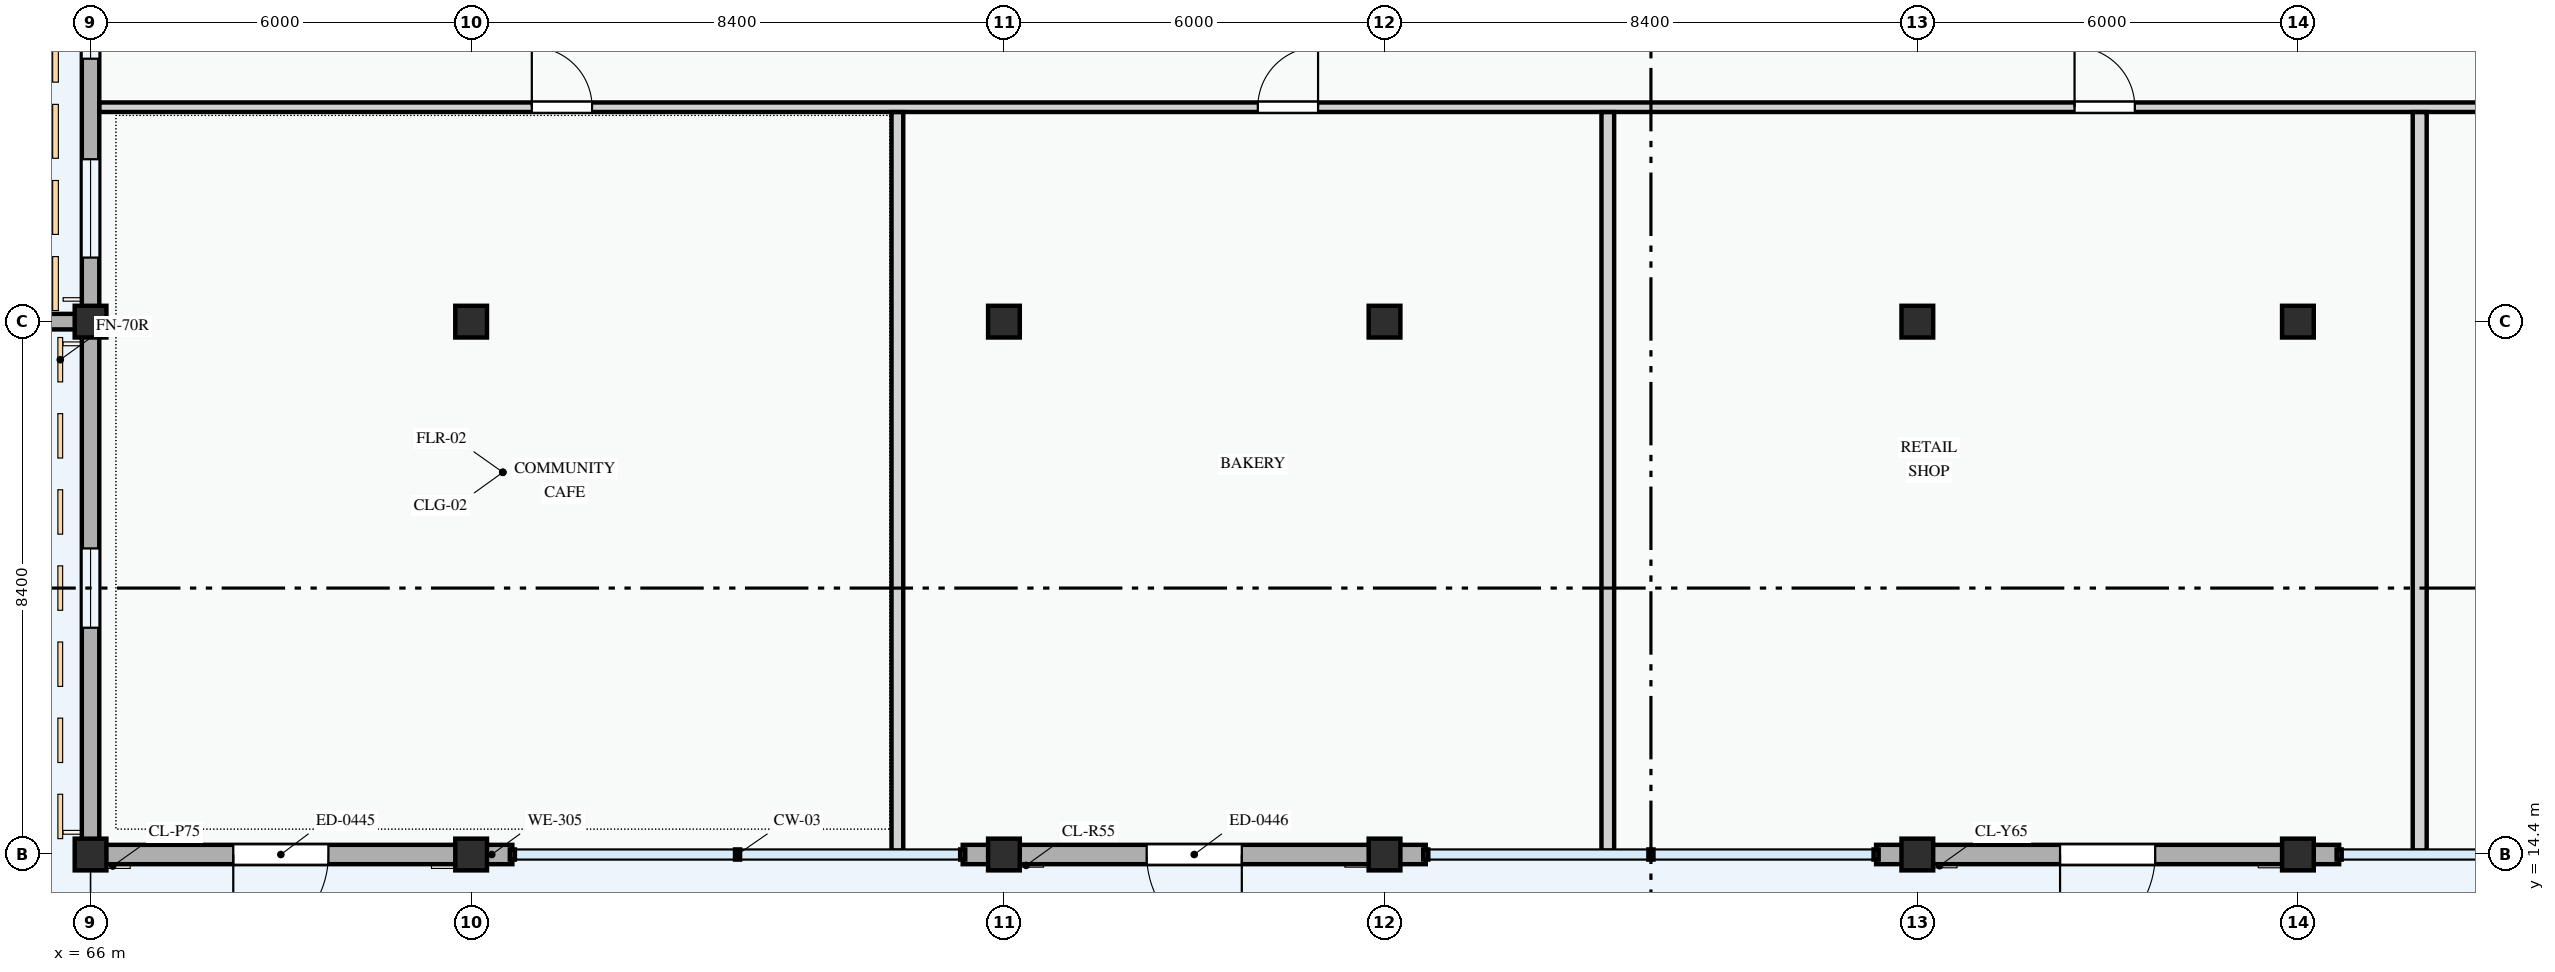
"""IFC4 building model, lengths in metres.
Left out: names, types, materials, properties, quantities, classifications, styles, units other than length and angle.
Written with IfcOpenShell. Run it as: python <this file> out.ifc"""

import sys

from ifc_helpers import new_model, si_unit, direction, frame, frame_2d, origin, origin_2d, place, context, subcontext, project, spatial, rectangle, circle, extrude, element, fill, save


model = new_model("IFC4")
c1 = context("Model", 3, precision=1e-05, world=origin(), true_north=direction((0.0, 1.0)))
c2 = subcontext(c1, "Body", "Model", "MODEL_VIEW")
j1 = project(units=[si_unit("LENGTHUNIT", "METRE"), si_unit("PLANEANGLEUNIT", "RADIAN")], contexts=[c1])
p1 = place(None, origin())
s1 = spatial("IfcSite", under=j1, at=p1, CompositionType="ELEMENT")
p2 = place(p1, origin())
s2 = spatial("IfcBuilding", under=s1, at=p2, CompositionType="ELEMENT")
p3 = place(p2, origin())
s3 = spatial("IfcBuildingStorey", under=s2, at=p3, CompositionType="ELEMENT", Elevation=0.0)
for number, where, z_axis, x_axis in (
    (1, (66.0, 14.4, 0.0), (0.0, 0.0, 1.0), (1.0, 0.0, 0.0)),
    (2, (66.0, 22.8, 0.0), (0.0, 0.0, 1.0), (1.0, 0.0, 0.0)),
    (3, (72.0, 14.4, 0.0), (0.0, 0.0, 1.0), (1.0, 0.0, 0.0)),
):
    element("IfcColumn", number, at=place(p3, frame(where, z_axis=z_axis, x_axis=x_axis)), inside=s3, PredefinedType="COLUMN", context=c2, shape_type="SweptSolid", body=[
        extrude(rectangle(XDim=0.5, YDim=0.5, at=origin_2d()), origin(), (0.0, 0.0, 1.0), 4.5),
    ])
p4 = place(p3, frame((72.0, 22.8, 0.0), z_axis=(0.0, 0.0, 1.0), x_axis=(1.0, 0.0, 0.0)))
e4 = element("IfcColumn", 4, at=p4, inside=s3, PredefinedType="COLUMN", context=c2, shape_type="SweptSolid", body=[
    extrude(circle(Radius=0.25, at=origin_2d()), origin(), (0.0, 0.0, 1.0), 4.5),
])
p5 = place(p3, frame((80.4, 14.4, 0.0), z_axis=(0.0, 0.0, 1.0), x_axis=(1.0, 0.0, 0.0)))
e5 = element("IfcColumn", 5, at=p5, inside=s3, PredefinedType="COLUMN", context=c2, shape_type="SweptSolid", body=[
    extrude(rectangle(XDim=0.5, YDim=0.5, at=origin_2d()), origin(), (0.0, 0.0, 1.0), 4.5),
])
p6 = place(p3, frame((80.4, 22.8, 0.0), z_axis=(0.0, 0.0, 1.0), x_axis=(1.0, 0.0, 0.0)))
e6 = element("IfcColumn", 6, at=p6, inside=s3, PredefinedType="COLUMN", context=c2, shape_type="SweptSolid", body=[
    extrude(circle(Radius=0.25, at=origin_2d()), origin(), (0.0, 0.0, 1.0), 4.5),
])
p7 = place(p3, frame((86.4, 14.4, 0.0), z_axis=(0.0, 0.0, 1.0), x_axis=(1.0, 0.0, 0.0)))
e7 = element("IfcColumn", 7, at=p7, inside=s3, PredefinedType="COLUMN", context=c2, shape_type="SweptSolid", body=[
    extrude(rectangle(XDim=0.5, YDim=0.5, at=origin_2d()), origin(), (0.0, 0.0, 1.0), 4.5),
])
p8 = place(p3, frame((86.4, 22.8, 0.0), z_axis=(0.0, 0.0, 1.0), x_axis=(1.0, 0.0, 0.0)))
e8 = element("IfcColumn", 8, at=p8, inside=s3, PredefinedType="COLUMN", context=c2, shape_type="SweptSolid", body=[
    extrude(circle(Radius=0.25, at=origin_2d()), origin(), (0.0, 0.0, 1.0), 4.5),
])
p9 = place(p3, frame((94.8, 14.4, 0.0), z_axis=(0.0, 0.0, 1.0), x_axis=(1.0, 0.0, 0.0)))
e9 = element("IfcColumn", 9, at=p9, inside=s3, PredefinedType="COLUMN", context=c2, shape_type="SweptSolid", body=[
    extrude(rectangle(XDim=0.5, YDim=0.5, at=origin_2d()), origin(), (0.0, 0.0, 1.0), 4.5),
])
p10 = place(p3, frame((94.8, 22.8, 0.0), z_axis=(0.0, 0.0, 1.0), x_axis=(1.0, 0.0, 0.0)))
e10 = element("IfcColumn", 10, at=p10, inside=s3, PredefinedType="COLUMN", context=c2, shape_type="SweptSolid", body=[
    extrude(circle(Radius=0.25, at=origin_2d()), origin(), (0.0, 0.0, 1.0), 4.5),
])
p11 = place(p3, frame((100.8, 14.4, 0.0), z_axis=(0.0, 0.0, 1.0), x_axis=(1.0, 0.0, 0.0)))
e11 = element("IfcColumn", 11, at=p11, inside=s3, PredefinedType="COLUMN", context=c2, shape_type="SweptSolid", body=[
    extrude(rectangle(XDim=0.5, YDim=0.5, at=origin_2d()), origin(), (0.0, 0.0, 1.0), 4.5),
])
p12 = place(p3, frame((100.8, 22.8, 0.0), z_axis=(0.0, 0.0, 1.0), x_axis=(1.0, 0.0, 0.0)))
e12 = element("IfcColumn", 12, at=p12, inside=s3, PredefinedType="COLUMN", context=c2, shape_type="SweptSolid", body=[
    extrude(circle(Radius=0.25, at=origin_2d()), origin(), (0.0, 0.0, 1.0), 4.5),
])
p13 = place(p3, frame((66.0, 14.4, 0.0), z_axis=(0.0, 0.0, 1.0), x_axis=(1.0, 0.0, 0.0)))
e13 = element("IfcWall", 13, at=p13, inside=s3, PredefinedType="STANDARD", context=c2, shape_type="SweptSolid", body=[
    extrude(rectangle(XDim=6.0, YDim=0.305, at=frame_2d((3.0, 0.0))), origin(), (0.0, 0.0, 1.0), 3.585),
])
p14 = place(p13, frame((2.25, 0.0, 0.0)))
e14 = element("IfcOpeningElement", 14, at=p14, cuts=e13, PredefinedType="OPENING", context=c2, shape_type="SweptSolid", body=[
    extrude(rectangle(XDim=1.5, YDim=2.3, at=frame_2d((0.75, 1.15))), frame((0.0, 0.163, 0.0), z_axis=(0.0, -1.0, 0.0), x_axis=(1.0, 0.0, 0.0)), (0.0, 0.0, 1.0), 0.325),
])
for number, where, z_axis, x_axis in (
    (15, (72.0, 14.4, 0.0), (0.0, 0.0, 1.0), (1.0, 0.0, 0.0)),
    (16, (79.75, 14.4, 0.0), (0.0, 0.0, 1.0), (1.0, 0.0, 0.0)),
):
    element("IfcWall", number, at=place(p3, frame(where, z_axis=z_axis, x_axis=x_axis)), inside=s3, PredefinedType="STANDARD", context=c2, shape_type="SweptSolid", body=[
        extrude(rectangle(XDim=0.65, YDim=0.305, at=frame_2d((0.325, 0.0))), origin(), (0.0, 0.0, 1.0), 3.485),
    ])
p15 = place(p3, frame((80.4, 14.4, 0.0), z_axis=(0.0, 0.0, 1.0), x_axis=(1.0, 0.0, 0.0)))
e17 = element("IfcWall", 17, at=p15, inside=s3, PredefinedType="STANDARD", context=c2, shape_type="SweptSolid", body=[
    extrude(rectangle(XDim=6.0, YDim=0.305, at=frame_2d((3.0, 0.0))), origin(), (0.0, 0.0, 1.0), 3.585),
])
p16 = place(p15, frame((2.25, 0.0, 0.0)))
e18 = element("IfcOpeningElement", 18, at=p16, cuts=e17, PredefinedType="OPENING", context=c2, shape_type="SweptSolid", body=[
    extrude(rectangle(XDim=1.5, YDim=2.3, at=frame_2d((0.75, 1.15))), frame((0.0, 0.163, 0.0), z_axis=(0.0, -1.0, 0.0), x_axis=(1.0, 0.0, 0.0)), (0.0, 0.0, 1.0), 0.325),
])
for number, where, z_axis, x_axis in (
    (19, (86.4, 14.4, 0.0), (0.0, 0.0, 1.0), (1.0, 0.0, 0.0)),
    (20, (94.15, 14.4, 0.0), (0.0, 0.0, 1.0), (1.0, 0.0, 0.0)),
):
    element("IfcWall", number, at=place(p3, frame(where, z_axis=z_axis, x_axis=x_axis)), inside=s3, PredefinedType="STANDARD", context=c2, shape_type="SweptSolid", body=[
        extrude(rectangle(XDim=0.65, YDim=0.305, at=frame_2d((0.325, 0.0))), origin(), (0.0, 0.0, 1.0), 3.485),
    ])
p17 = place(p3, frame((94.8, 14.4, 0.0), z_axis=(0.0, 0.0, 1.0), x_axis=(1.0, 0.0, 0.0)))
e21 = element("IfcWall", 21, at=p17, inside=s3, PredefinedType="STANDARD", context=c2, shape_type="SweptSolid", body=[
    extrude(rectangle(XDim=6.0, YDim=0.305, at=frame_2d((3.0, 0.0))), origin(), (0.0, 0.0, 1.0), 3.585),
])
p18 = place(p17, frame((2.25, 0.0, 0.0)))
e22 = element("IfcOpeningElement", 22, at=p18, cuts=e21, PredefinedType="OPENING", context=c2, shape_type="SweptSolid", body=[
    extrude(rectangle(XDim=1.5, YDim=2.3, at=frame_2d((0.75, 1.15))), frame((0.0, 0.163, 0.0), z_axis=(0.0, -1.0, 0.0), x_axis=(1.0, 0.0, 0.0)), (0.0, 0.0, 1.0), 0.325),
])
p19 = place(p3, frame((100.8, 14.4, 0.0), z_axis=(0.0, 0.0, 1.0), x_axis=(1.0, 0.0, 0.0)))
e23 = element("IfcWall", 23, at=p19, inside=s3, PredefinedType="STANDARD", context=c2, shape_type="SweptSolid", body=[
    extrude(rectangle(XDim=0.65, YDim=0.305, at=frame_2d((0.325, 0.0))), origin(), (0.0, 0.0, 1.0), 3.485),
])
p20 = place(p3, frame((66.0, 28.8, 0.0), z_axis=(0.0, 0.0, 1.0), x_axis=(0.0, -1.0, 0.0)))
e24 = element("IfcWall", 24, at=p20, inside=s3, PredefinedType="STANDARD", context=c2, shape_type="SweptSolid", body=[
    extrude(rectangle(XDim=6.0, YDim=0.275, at=frame_2d((3.0, 0.0))), origin(), (0.0, 0.0, 1.0), 3.585),
])
p21 = place(p20, frame((0.955, 0.0, 0.8)))
e25 = element("IfcOpeningElement", 25, at=p21, cuts=e24, PredefinedType="OPENING", context=c2, shape_type="SweptSolid", body=[
    extrude(rectangle(XDim=0.9, YDim=1.2, at=frame_2d((0.45, 0.6))), frame((0.0, 0.147, 0.0), z_axis=(0.0, -1.0, 0.0), x_axis=(1.0, 0.0, 0.0)), (0.0, 0.0, 1.0), 0.295),
])
p22 = place(p20, frame((3.44, 0.0, 0.8)))
e26 = element("IfcOpeningElement", 26, at=p22, cuts=e24, PredefinedType="OPENING", context=c2, shape_type="SweptSolid", body=[
    extrude(rectangle(XDim=1.55, YDim=1.4, at=frame_2d((0.775, 0.7))), frame((0.0, 0.147, 0.0), z_axis=(0.0, -1.0, 0.0), x_axis=(1.0, 0.0, 0.0)), (0.0, 0.0, 1.0), 0.295),
])
p23 = place(p3, frame((66.0, 22.8, 0.0), z_axis=(0.0, 0.0, 1.0), x_axis=(0.0, -1.0, 0.0)))
e27 = element("IfcWall", 27, at=p23, inside=s3, PredefinedType="STANDARD", context=c2, shape_type="SweptSolid", body=[
    extrude(rectangle(XDim=8.4, YDim=0.275, at=frame_2d((4.2, 0.0))), origin(), (0.0, 0.0, 1.0), 3.485),
])
p24 = place(p23, frame((3.575, 0.0, 0.8)))
e28 = element("IfcOpeningElement", 28, at=p24, cuts=e27, PredefinedType="OPENING", context=c2, shape_type="SweptSolid", body=[
    extrude(rectangle(XDim=1.25, YDim=1.3, at=frame_2d((0.625, 0.65))), frame((0.0, 0.147, 0.0), z_axis=(0.0, -1.0, 0.0), x_axis=(1.0, 0.0, 0.0)), (0.0, 0.0, 1.0), 0.295),
])
p25 = place(p3, frame((57.6, 22.8, 0.0), z_axis=(0.0, 0.0, 1.0), x_axis=(1.0, 0.0, 0.0)))
e29 = element("IfcWall", 29, at=p25, inside=s3, PredefinedType="STANDARD", context=c2, shape_type="SweptSolid", body=[
    extrude(rectangle(XDim=8.4, YDim=0.245, at=frame_2d((4.2, 0.0))), origin(), (0.0, 0.0, 1.0), 2.35),
])
p26 = place(p25, frame((3.475, 0.0, 0.0)))
e30 = element("IfcOpeningElement", 30, at=p26, cuts=e29, PredefinedType="OPENING", context=c2, shape_type="SweptSolid", body=[
    extrude(rectangle(XDim=1.45, YDim=2.1, at=frame_2d((0.725, 1.05))), frame((0.0, 0.133, 0.0), z_axis=(0.0, -1.0, 0.0), x_axis=(1.0, 0.0, 0.0)), (0.0, 0.0, 1.0), 0.265),
])
p27 = place(p3, frame((66.139, 26.18, 0.0), z_axis=(0.0, 0.0, 1.0), x_axis=(1.0, 0.0, 0.0)))
e31 = element("IfcWall", 31, at=p27, inside=s3, PredefinedType="PARTITIONING", context=c2, shape_type="SweptSolid", body=[
    extrude(rectangle(XDim=48.921, YDim=0.15, at=frame_2d((24.46, 0.0))), origin(), (0.0, 0.0, 1.0), 4.2),
])
p28 = place(p27, frame((6.817, 0.0, 0.0)))
e32 = element("IfcOpeningElement", 32, at=p28, cuts=e31, PredefinedType="OPENING", context=c2, shape_type="SweptSolid", body=[
    extrude(rectangle(XDim=0.95, YDim=2.1, at=frame_2d((0.475, 1.05))), frame((0.0, 0.085, 0.0), z_axis=(0.0, -1.0, 0.0), x_axis=(1.0, 0.0, 0.0)), (0.0, 0.0, 1.0), 0.17),
])
p29 = place(p27, frame((18.263, 0.0, 0.0)))
e33 = element("IfcOpeningElement", 33, at=p29, cuts=e31, PredefinedType="OPENING", context=c2, shape_type="SweptSolid", body=[
    extrude(rectangle(XDim=0.95, YDim=2.1, at=frame_2d((0.475, 1.05))), frame((0.0, 0.085, 0.0), z_axis=(0.0, -1.0, 0.0), x_axis=(1.0, 0.0, 0.0)), (0.0, 0.0, 1.0), 0.17),
])
p30 = place(p27, frame((31.139, 0.0, 0.0)))
e34 = element("IfcOpeningElement", 34, at=p30, cuts=e31, PredefinedType="OPENING", context=c2, shape_type="SweptSolid", body=[
    extrude(rectangle(XDim=0.95, YDim=2.1, at=frame_2d((0.475, 1.05))), frame((0.0, 0.085, 0.0), z_axis=(0.0, -1.0, 0.0), x_axis=(1.0, 0.0, 0.0)), (0.0, 0.0, 1.0), 0.17),
])
p31 = place(p27, frame((42.108, 0.0, 0.0)))
e35 = element("IfcOpeningElement", 35, at=p31, cuts=e31, PredefinedType="OPENING", context=c2, shape_type="SweptSolid", body=[
    extrude(rectangle(XDim=0.95, YDim=2.1, at=frame_2d((0.475, 1.05))), frame((0.0, 0.085, 0.0), z_axis=(0.0, -1.0, 0.0), x_axis=(1.0, 0.0, 0.0)), (0.0, 0.0, 1.0), 0.17),
])
p32 = place(p3, frame((78.72, 14.46, 0.0), z_axis=(0.0, 0.0, 1.0), x_axis=(0.0, 1.0, 0.0)))
e36 = element("IfcWall", 36, at=p32, inside=s3, PredefinedType="PARTITIONING", context=c2, shape_type="SweptSolid", body=[
    extrude(rectangle(XDim=11.643, YDim=0.185, at=frame_2d((5.822, 0.0))), origin(), (0.0, 0.0, 1.0), 4.2),
])
p33 = place(p3, frame((89.92, 14.46, 0.0), z_axis=(0.0, 0.0, 1.0), x_axis=(0.0, 1.0, 0.0)))
e37 = element("IfcWall", 37, at=p33, inside=s3, PredefinedType="PARTITIONING", context=c2, shape_type="SweptSolid", body=[
    extrude(rectangle(XDim=11.643, YDim=0.2, at=frame_2d((5.822, 0.0))), origin(), (0.0, 0.0, 1.0), 4.2),
])
p34 = place(p3, frame((102.72, 14.46, 0.0), z_axis=(0.0, 0.0, 1.0), x_axis=(0.0, 1.0, 0.0)))
e38 = element("IfcWall", 38, at=p34, inside=s3, PredefinedType="PARTITIONING", context=c2, shape_type="SweptSolid", body=[
    extrude(rectangle(XDim=11.643, YDim=0.22, at=frame_2d((5.822, 0.0))), origin(), (0.0, 0.0, 1.0), 4.2),
])
p35 = place(p14, frame((1.5, 0.0, 0.0), z_axis=(0.0, 0.0, 1.0), x_axis=(-1.0, 0.0, 0.0)))
e39 = element("IfcDoor", 39, at=p35, inside=s3, OperationType="SINGLE_SWING_RIGHT", PredefinedType="DOOR", context=c2, shape_type="SweptSolid", body=[
    extrude(rectangle(XDim=1.5, YDim=2.3, at=frame_2d((0.75, 1.15))), frame((0.0, 0.025, 0.0), z_axis=(0.0, -1.0, 0.0), x_axis=(1.0, 0.0, 0.0)), (0.0, 0.0, 1.0), 0.05),
])
fill(e14, e39)
p36 = place(p16, frame((1.5, 0.0, 0.0), z_axis=(0.0, 0.0, 1.0), x_axis=(-1.0, 0.0, 0.0)))
e40 = element("IfcDoor", 40, at=p36, inside=s3, OperationType="SINGLE_SWING_LEFT", PredefinedType="DOOR", context=c2, shape_type="SweptSolid", body=[
    extrude(rectangle(XDim=1.5, YDim=2.3, at=frame_2d((0.75, 1.15))), frame((0.0, 0.025, 0.0), z_axis=(0.0, -1.0, 0.0), x_axis=(1.0, 0.0, 0.0)), (0.0, 0.0, 1.0), 0.05),
])
fill(e18, e40)
p37 = place(p18, frame((1.5, 0.0, 0.0), z_axis=(0.0, 0.0, 1.0), x_axis=(-1.0, 0.0, 0.0)))
e41 = element("IfcDoor", 41, at=p37, inside=s3, OperationType="SINGLE_SWING_RIGHT", PredefinedType="DOOR", context=c2, shape_type="SweptSolid", body=[
    extrude(rectangle(XDim=1.5, YDim=2.3, at=frame_2d((0.75, 1.15))), frame((0.0, 0.025, 0.0), z_axis=(0.0, -1.0, 0.0), x_axis=(1.0, 0.0, 0.0)), (0.0, 0.0, 1.0), 0.05),
])
fill(e22, e41)
p38 = place(p21, origin())
e42 = element("IfcWindow", 42, at=p38, inside=s3, PartitioningType="SINGLE_PANEL", PredefinedType="WINDOW", context=c2, shape_type="SweptSolid", body=[
    extrude(rectangle(XDim=0.9, YDim=1.2, at=frame_2d((0.45, 0.6))), frame((0.0, 0.03, 0.0), z_axis=(0.0, -1.0, 0.0), x_axis=(1.0, 0.0, 0.0)), (0.0, 0.0, 1.0), 0.06),
])
fill(e25, e42)
p39 = place(p22, origin())
e43 = element("IfcWindow", 43, at=p39, inside=s3, PartitioningType="SINGLE_PANEL", PredefinedType="WINDOW", context=c2, shape_type="SweptSolid", body=[
    extrude(rectangle(XDim=1.55, YDim=1.4, at=frame_2d((0.775, 0.7))), frame((0.0, 0.03, 0.0), z_axis=(0.0, -1.0, 0.0), x_axis=(1.0, 0.0, 0.0)), (0.0, 0.0, 1.0), 0.06),
])
fill(e26, e43)
p40 = place(p24, origin())
e44 = element("IfcWindow", 44, at=p40, inside=s3, PartitioningType="SINGLE_PANEL", PredefinedType="WINDOW", context=c2, shape_type="SweptSolid", body=[
    extrude(rectangle(XDim=1.25, YDim=1.3, at=frame_2d((0.625, 0.65))), frame((0.0, 0.03, 0.0), z_axis=(0.0, -1.0, 0.0), x_axis=(1.0, 0.0, 0.0)), (0.0, 0.0, 1.0), 0.06),
])
fill(e28, e44)
p41 = place(p28, origin())
e45 = element("IfcDoor", 45, at=p41, inside=s3, OperationType="SINGLE_SWING_LEFT", PredefinedType="DOOR", context=c2, shape_type="SweptSolid", body=[
    extrude(rectangle(XDim=0.95, YDim=2.1, at=frame_2d((0.475, 1.05))), frame((0.0, 0.025, 0.0), z_axis=(0.0, -1.0, 0.0), x_axis=(1.0, 0.0, 0.0)), (0.0, 0.0, 1.0), 0.05),
])
fill(e32, e45)
p42 = place(p29, origin())
e46 = element("IfcDoor", 46, at=p42, inside=s3, OperationType="SINGLE_SWING_RIGHT", PredefinedType="DOOR", context=c2, shape_type="SweptSolid", body=[
    extrude(rectangle(XDim=0.95, YDim=2.1, at=frame_2d((0.475, 1.05))), frame((0.0, 0.025, 0.0), z_axis=(0.0, -1.0, 0.0), x_axis=(1.0, 0.0, 0.0)), (0.0, 0.0, 1.0), 0.05),
])
fill(e33, e46)
p43 = place(p30, origin())
e47 = element("IfcDoor", 47, at=p43, inside=s3, OperationType="SINGLE_SWING_LEFT", PredefinedType="DOOR", context=c2, shape_type="SweptSolid", body=[
    extrude(rectangle(XDim=0.95, YDim=2.1, at=frame_2d((0.475, 1.05))), frame((0.0, 0.025, 0.0), z_axis=(0.0, -1.0, 0.0), x_axis=(1.0, 0.0, 0.0)), (0.0, 0.0, 1.0), 0.05),
])
fill(e34, e47)
save(model, sys.argv[1])
